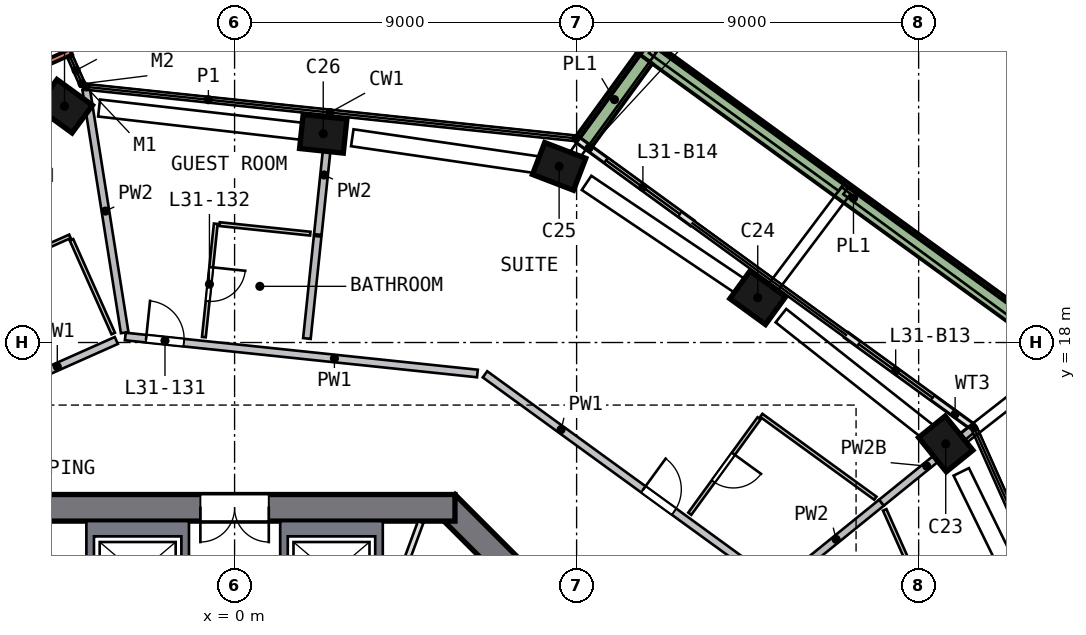
"""IFC4 building model, lengths in metres.
Left out: names, types, materials, properties, quantities, classifications, styles, units other than length and angle.
Written with IfcOpenShell. Run it as: python <this file> out.ifc"""

import sys

from ifc_helpers import new_model, si_unit, direction, frame, frame_2d, origin, origin_2d, place, context, subcontext, project, spatial, polyline, rectangle, outline, extrude, element, fill, save


model = new_model("IFC4")
c1 = context("Model", 3, precision=1e-05, world=origin(), true_north=direction((0.0, 1.0)))
c2 = subcontext(c1, "Body", "Model", "MODEL_VIEW")
j1 = project(units=[si_unit("LENGTHUNIT", "METRE"), si_unit("PLANEANGLEUNIT", "RADIAN")], contexts=[c1])
p1 = place(None, origin())
s1 = spatial("IfcSite", under=j1, at=p1, CompositionType="ELEMENT")
p2 = place(p1, origin())
s2 = spatial("IfcBuilding", under=s1, at=p2, CompositionType="ELEMENT")
p3 = place(p2, frame((0.0, 0.0, 133.0)))
s3 = spatial("IfcBuildingStorey", under=s2, at=p3, CompositionType="ELEMENT", Elevation=133.0)
p4 = place(p3, frame((18.801, 15.225, 0.0), z_axis=(-0.073137387, 0.088798823, 0.993360806), x_axis=(0.62500061, -0.772101593, 0.115036373)))
e1 = element("IfcColumn", 1, at=p4, inside=s3, PredefinedType="COLUMN", context=c2, shape_type="SweptSolid", body=[
    extrude(rectangle(XDim=1.15, YDim=0.9, at=origin_2d()), origin(), (0.0, 0.0, 1.0), 3.211),
])
p5 = place(p3, frame((13.877, 19.1, 0.0), z_axis=(-0.091412441, 0.065251144, 0.993673012), x_axis=(-0.803839453, 0.584148171, -0.112307833)))
e2 = element("IfcColumn", 2, at=p5, inside=s3, PredefinedType="COLUMN", context=c2, shape_type="SweptSolid", body=[
    extrude(rectangle(XDim=1.15, YDim=0.9, at=origin_2d()), origin(), (0.0, 0.0, 1.0), 3.21),
])
p6 = place(p3, frame((8.67, 22.586, 0.0), z_axis=(-0.107729337, 0.040369992, 0.993360284), x_axis=(0.927200738, -0.356460917, 0.115040884)))
e3 = element("IfcColumn", 3, at=p6, inside=s3, PredefinedType="COLUMN", context=c2, shape_type="SweptSolid", body=[
    extrude(rectangle(XDim=1.15, YDim=0.9, at=origin_2d()), origin(), (0.0, 0.0, 1.0), 3.211),
])
p7 = place(p3, frame((2.468, 23.479, 0.0), z_axis=(-0.111793887, 0.010799137, 0.993672736), x_axis=(-0.98822294, 0.103931825, -0.112310274)))
e4 = element("IfcColumn", 4, at=p7, inside=s3, PredefinedType="COLUMN", context=c2, shape_type="SweptSolid", body=[
    extrude(rectangle(XDim=1.15, YDim=0.9, at=origin_2d()), origin(), (0.0, 0.0, 1.0), 3.21),
])
p8 = place(p3, frame((-4.336, 24.244, 0.0), z_axis=(-0.115076293, -0.021586306, 0.993122086), x_axis=(0.802407677, -0.591373084, 0.080123624)))
e5 = element("IfcColumn", 5, at=p8, inside=s3, PredefinedType="COLUMN", context=c2, shape_type="SweptSolid", body=[
    extrude(rectangle(XDim=1.15, YDim=0.9, at=origin_2d()), origin(), (0.0, 0.0, 1.0), 3.212),
])
p9 = place(p3, frame((13.752, 5.552, 0.0), z_axis=(0.0, 0.0, 1.0), x_axis=(-0.707106781, 0.707106781, 0.0)))
e6 = element("IfcWall", 6, at=p9, inside=s3, PredefinedType="SHEAR", context=c2, shape_type="SweptSolid", body=[
    extrude(rectangle(XDim=11.598, YDim=0.7, at=frame_2d((5.799, 0.0))), origin(), (0.0, 0.0, 1.0), 3.5),
])
p10 = place(p9, frame((2.099, 0.0, 0.0)))
e7 = element("IfcOpeningElement", 7, at=p10, cuts=e6, PredefinedType="OPENING", context=c2, shape_type="SweptSolid", body=[
    extrude(rectangle(XDim=1.2, YDim=2.1, at=frame_2d((0.6, 1.05))), frame((0.0, 0.36, 0.0), z_axis=(0.0, -1.0, 0.0), x_axis=(1.0, 0.0, 0.0)), (0.0, 0.0, 1.0), 0.72),
])
p11 = place(p3, frame((5.799, 13.65, 0.0), z_axis=(0.0, 0.0, 1.0), x_axis=(-1.0, 0.0, 0.0)))
e8 = element("IfcWall", 8, at=p11, inside=s3, PredefinedType="SHEAR", context=c2, shape_type="SweptSolid", body=[
    extrude(rectangle(XDim=11.598, YDim=0.7, at=frame_2d((5.799, 0.0))), origin(), (0.0, 0.0, 1.0), 3.5),
])
p12 = place(p11, frame((4.899, 0.0, 0.0)))
e9 = element("IfcOpeningElement", 9, at=p12, cuts=e8, PredefinedType="OPENING", context=c2, shape_type="SweptSolid", body=[
    extrude(rectangle(XDim=1.8, YDim=2.1, at=frame_2d((0.9, 1.05))), frame((0.0, 0.36, 0.0), z_axis=(0.0, -1.0, 0.0), x_axis=(1.0, 0.0, 0.0)), (0.0, 0.0, 1.0), 0.72),
])
p13 = place(p3, frame((-4.305, 25.65, 0.0), z_axis=(0.0, 0.0, 1.0), x_axis=(-0.913532126, -0.406766585, 0.0)))
e10 = element("IfcWall", 10, at=p13, inside=s3, PredefinedType="SOLIDWALL", context=c2, shape_type="SweptSolid", body=[
    extrude(rectangle(XDim=1.875, YDim=0.15, at=frame_2d((0.938, 0.0))), origin(), (0.0, 0.0, 1.0), 3.19),
])
p14 = place(p3, frame((19.392, 15.803, 0.0), z_axis=(0.0, 0.0, 1.0), x_axis=(-0.808990358, 0.587821913, 0.0)))
e11 = element("IfcWall", 11, at=p14, inside=s3, PredefinedType="SOLIDWALL", context=c2, shape_type="SweptSolid", body=[
    extrude(rectangle(XDim=4.068, YDim=0.15, at=frame_2d((2.034, 0.0))), origin(), (0.0, 0.0, 1.0), 2.475),
])
p15 = place(p14, frame((1.268, 0.0, 0.0)))
e12 = element("IfcOpeningElement", 12, at=p15, cuts=e11, PredefinedType="OPENING", context=c2, shape_type="SweptSolid", body=[
    extrude(rectangle(XDim=2.4, YDim=2.4, at=frame_2d((1.2, 1.2))), frame((0.0, 0.085, 0.0), z_axis=(0.0, -1.0, 0.0), x_axis=(1.0, 0.0, 0.0)), (0.0, 0.0, 1.0), 0.17),
])
p16 = place(p3, frame((12.039, 21.146, 0.0), z_axis=(0.0, 0.0, 1.0), x_axis=(-0.809020557, 0.587780349, 0.0)))
e13 = element("IfcWall", 13, at=p16, inside=s3, PredefinedType="SOLIDWALL", context=c2, shape_type="SweptSolid", body=[
    extrude(rectangle(XDim=3.71, YDim=0.15, at=frame_2d((1.855, 0.0))), origin(), (0.0, 0.0, 1.0), 2.475),
])
p17 = place(p16, frame((0.4, 0.0, 0.0)))
e14 = element("IfcOpeningElement", 14, at=p17, cuts=e13, PredefinedType="OPENING", context=c2, shape_type="SweptSolid", body=[
    extrude(rectangle(XDim=2.4, YDim=2.4, at=frame_2d((1.2, 1.2))), frame((0.0, 0.085, 0.0), z_axis=(0.0, -1.0, 0.0), x_axis=(1.0, 0.0, 0.0)), (0.0, 0.0, 1.0), 0.17),
])
p18 = place(p3, frame((21.837, 17.766, 0.0), z_axis=(0.0, 0.0, 1.0), x_axis=(-0.809019092, 0.587782365, 0.0)))
e15 = element("IfcWall", 15, at=p18, inside=s3, PredefinedType="SOLIDWALL", context=c2, shape_type="SweptSolid", body=[
    extrude(rectangle(XDim=13.723, YDim=0.5, at=frame_2d((6.862, 0.0))), origin(), (0.0, 0.0, 1.0), 0.7),
])
p19 = place(p3, frame((10.789, 25.483, 0.0), z_axis=(0.0, 0.0, 1.0), x_axis=(-0.587773626, -0.809025441, 0.0)))
e16 = element("IfcWall", 16, at=p19, inside=s3, PredefinedType="SOLIDWALL", context=c2, shape_type="SweptSolid", body=[
    extrude(rectangle(XDim=2.699, YDim=0.5, at=frame_2d((1.35, 0.0))), origin(), (0.0, 0.0, 1.0), 0.7),
])
p20 = place(p3, origin())
e17 = element("IfcWall", 17, at=p20, inside=s3, PredefinedType="SOLIDWALL", context=c2, shape_type="SweptSolid", body=[
    extrude(outline(polyline([(3.9, 13.3), (3.9, 10.9), (3.7, 10.9), (3.7, 12.9), (1.4, 12.9), (1.4, 10.9), (1.2, 10.9), (1.2, 13.3), (3.9, 13.3)])), origin(), (0.0, 0.0, 1.0), 3.19),
])
p21 = place(p3, origin())
e18 = element("IfcWall", 18, at=p21, inside=s3, PredefinedType="SOLIDWALL", context=c2, shape_type="SweptSolid", body=[
    extrude(outline(polyline([(-3.9, 10.9), (-3.9, 13.3), (-1.2, 13.3), (-1.2, 10.9), (-1.4, 10.9), (-1.4, 12.9), (-3.7, 12.9), (-3.7, 10.9), (-3.9, 10.9)])), origin(), (0.0, 0.0, 1.0), 3.19),
])
p22 = place(p3, frame((1.776, 4.813, 0.0), z_axis=(0.0, 0.0, 1.0), x_axis=(0.346109381, 0.938194168, 0.0)))
e19 = element("IfcWall", 19, at=p22, inside=s3, PredefinedType="PARTITIONING", context=c2, shape_type="SweptSolid", body=[
    extrude(rectangle(XDim=9.016, YDim=0.15, at=frame_2d((4.508, 0.0))), origin(), (0.0, 0.0, 1.0), 3.19),
])
p23 = place(p22, frame((1.4, 0.0, 0.0)))
e20 = element("IfcOpeningElement", 20, at=p23, cuts=e19, PredefinedType="OPENING", context=c2, shape_type="SweptSolid", body=[
    extrude(rectangle(XDim=1.8, YDim=2.1, at=frame_2d((0.9, 1.05))), frame((0.0, 0.085, 0.0), z_axis=(0.0, -1.0, 0.0), x_axis=(1.0, 0.0, 0.0)), (0.0, 0.0, 1.0), 0.17),
])
p24 = place(p3, frame((-3.112, 18.053, 0.0), z_axis=(0.0, 0.0, 1.0), x_axis=(-0.913524094, -0.406784624, 0.0)))
e21 = element("IfcWall", 21, at=p24, inside=s3, PredefinedType="SOLIDWALL", context=c2, shape_type="SweptSolid", body=[
    extrude(rectangle(XDim=3.4, YDim=0.2, at=frame_2d((1.7, 0.0))), origin(), (0.0, 0.0, 1.0), 3.19),
])
p25 = place(p3, frame((-2.876, 18.158, 0.0), z_axis=(0.0, 0.0, 1.0), x_axis=(0.994521094, -0.104536091, 0.0)))
e22 = element("IfcWall", 22, at=p25, inside=s3, PredefinedType="SOLIDWALL", context=c2, shape_type="SweptSolid", body=[
    extrude(rectangle(XDim=9.316, YDim=0.2, at=frame_2d((4.658, 0.0))), origin(), (0.0, 0.0, 1.0), 3.19),
])
p26 = place(p25, frame((0.55, 0.0, 0.0)))
e23 = element("IfcOpeningElement", 23, at=p26, cuts=e22, PredefinedType="OPENING", context=c2, shape_type="SweptSolid", body=[
    extrude(rectangle(XDim=1.0, YDim=2.1, at=frame_2d((0.5, 1.05))), frame((0.0, 0.11, 0.0), z_axis=(0.0, -1.0, 0.0), x_axis=(1.0, 0.0, 0.0)), (0.0, 0.0, 1.0), 0.22),
])
p27 = place(p3, frame((6.589, 17.163, 0.0), z_axis=(0.0, 0.0, 1.0), x_axis=(0.809014458, -0.587788744, 0.0)))
e24 = element("IfcWall", 24, at=p27, inside=s3, PredefinedType="SOLIDWALL", context=c2, shape_type="SweptSolid", body=[
    extrude(rectangle(XDim=9.516, YDim=0.2, at=frame_2d((4.758, 0.0))), origin(), (0.0, 0.0, 1.0), 3.19),
])
p28 = place(p27, frame((5.15, 0.0, 0.0)))
e25 = element("IfcOpeningElement", 25, at=p28, cuts=e24, PredefinedType="OPENING", context=c2, shape_type="SweptSolid", body=[
    extrude(rectangle(XDim=1.0, YDim=2.1, at=frame_2d((0.5, 1.05))), frame((0.0, 0.11, 0.0), z_axis=(0.0, -1.0, 0.0), x_axis=(1.0, 0.0, 0.0)), (0.0, 0.0, 1.0), 0.22),
])
p29 = place(p3, frame((-3.905, 24.657, 0.0), z_axis=(0.0, 0.0, 1.0), x_axis=(0.156458166, -0.987684586, 0.0)))
e26 = element("IfcWall", 26, at=p29, inside=s3, PredefinedType="SOLIDWALL", context=c2, shape_type="SweptSolid", body=[
    extrude(rectangle(XDim=6.476, YDim=0.2, at=frame_2d((3.238, 0.0))), origin(), (0.0, 0.0, 1.0), 3.19),
])
p30 = place(p3, frame((1.903, 18.106, 0.0), z_axis=(0.0, 0.0, 1.0), x_axis=(0.104525029, 0.994522256, 0.0)))
e27 = element("IfcWall", 27, at=p30, inside=s3, PredefinedType="SOLIDWALL", context=c2, shape_type="SweptSolid", body=[
    extrude(rectangle(XDim=2.705, YDim=0.2, at=frame_2d((1.353, 0.0))), origin(), (0.0, 0.0, 1.0), 3.19),
])
p31 = place(p3, frame((2.19, 20.842, 0.0), z_axis=(0.0, 0.0, 1.0), x_axis=(0.104563827, 0.994518178, 0.0)))
e28 = element("IfcWall", 28, at=p31, inside=s3, PredefinedType="SOLIDWALL", context=c2, shape_type="SweptSolid", body=[
    extrude(rectangle(XDim=3.152, YDim=0.2, at=frame_2d((1.576, 0.0))), origin(), (0.0, 0.0, 1.0), 3.19),
])
p32 = place(p3, frame((14.635, 11.851, 0.0), z_axis=(0.0, 0.0, 1.0), x_axis=(0.77712644, 0.629344497, 0.0)))
e29 = element("IfcWall", 29, at=p32, inside=s3, PredefinedType="SOLIDWALL", context=c2, shape_type="SweptSolid", body=[
    extrude(rectangle(XDim=3.073, YDim=0.2, at=frame_2d((1.536, 0.0))), origin(), (0.0, 0.0, 1.0), 3.19),
])
p33 = place(p3, frame((17.023, 13.785, 0.0), z_axis=(0.0, 0.0, 1.0), x_axis=(0.777133351, 0.629335963, 0.0)))
e30 = element("IfcWall", 30, at=p33, inside=s3, PredefinedType="SOLIDWALL", context=c2, shape_type="SweptSolid", body=[
    extrude(rectangle(XDim=3.059, YDim=0.2, at=frame_2d((1.53, 0.0))), origin(), (0.0, 0.0, 1.0), 2.69),
])
p34 = place(p3, frame((-4.332, 20.794, 0.0), z_axis=(0.0, 0.0, 1.0), x_axis=(-0.913550228, -0.406725928, 0.0)))
e31 = element("IfcWall", 31, at=p34, inside=s3, PredefinedType="PARTITIONING", context=c2, shape_type="SweptSolid", body=[
    extrude(rectangle(XDim=3.2, YDim=0.1, at=frame_2d((1.6, 0.0))), origin(), (0.0, 0.0, 1.0), 3.19),
])
p35 = place(p34, frame((1.25, 0.0, 0.0)))
e32 = element("IfcOpeningElement", 32, at=p35, cuts=e31, PredefinedType="OPENING", context=c2, shape_type="SweptSolid", body=[
    extrude(rectangle(XDim=0.9, YDim=2.1, at=frame_2d((0.45, 1.05))), frame((0.0, 0.06, 0.0), z_axis=(0.0, -1.0, 0.0), x_axis=(1.0, 0.0, 0.0)), (0.0, 0.0, 1.0), 0.12),
])
p36 = place(p3, frame((-3.193, 18.236, 0.0), z_axis=(0.0, 0.0, 1.0), x_axis=(-0.40672567, 0.913550343, 0.0)))
e33 = element("IfcWall", 33, at=p36, inside=s3, PredefinedType="PARTITIONING", context=c2, shape_type="SweptSolid", body=[
    extrude(rectangle(XDim=2.7, YDim=0.1, at=frame_2d((1.35, 0.0))), origin(), (0.0, 0.0, 1.0), 3.19),
])
p37 = place(p3, frame((-0.494, 21.126, 0.0), z_axis=(0.0, 0.0, 1.0), x_axis=(-0.104570409, -0.994517486, 0.0)))
e34 = element("IfcWall", 34, at=p37, inside=s3, PredefinedType="PARTITIONING", context=c2, shape_type="SweptSolid", body=[
    extrude(rectangle(XDim=3.0, YDim=0.1, at=frame_2d((1.5, 0.0))), origin(), (0.0, 0.0, 1.0), 3.19),
])
p38 = place(p37, frame((1.15, 0.0, 0.0)))
e35 = element("IfcOpeningElement", 35, at=p38, cuts=e34, PredefinedType="OPENING", context=c2, shape_type="SweptSolid", body=[
    extrude(rectangle(XDim=0.9, YDim=2.1, at=frame_2d((0.45, 1.05))), frame((0.0, 0.06, 0.0), z_axis=(0.0, -1.0, 0.0), x_axis=(1.0, 0.0, 0.0)), (0.0, 0.0, 1.0), 0.12),
])
p39 = place(p3, frame((-0.395, 21.115, 0.0), z_axis=(0.0, 0.0, 1.0), x_axis=(0.994527171, -0.104478253, 0.0)))
e36 = element("IfcWall", 36, at=p39, inside=s3, PredefinedType="PARTITIONING", context=c2, shape_type="SweptSolid", body=[
    extrude(rectangle(XDim=2.4, YDim=0.1, at=frame_2d((1.2, 0.0))), origin(), (0.0, 0.0, 1.0), 3.19),
])
p40 = place(p3, frame((13.8, 16.003, 0.0), z_axis=(0.0, 0.0, 1.0), x_axis=(-0.58778294, -0.809018674, 0.0)))
e37 = element("IfcWall", 37, at=p40, inside=s3, PredefinedType="PARTITIONING", context=c2, shape_type="SweptSolid", body=[
    extrude(rectangle(XDim=3.1, YDim=0.1, at=frame_2d((1.55, 0.0))), origin(), (0.0, 0.0, 1.0), 3.19),
])
p41 = place(p40, frame((1.15, 0.0, 0.0)))
e38 = element("IfcOpeningElement", 38, at=p41, cuts=e37, PredefinedType="OPENING", context=c2, shape_type="SweptSolid", body=[
    extrude(rectangle(XDim=0.9, YDim=2.1, at=frame_2d((0.45, 1.05))), frame((0.0, 0.06, 0.0), z_axis=(0.0, -1.0, 0.0), x_axis=(1.0, 0.0, 0.0)), (0.0, 0.0, 1.0), 0.12),
])
p42 = place(p3, frame((13.859, 16.084, 0.0), z_axis=(0.0, 0.0, 1.0), x_axis=(0.808994891, -0.587815674, 0.0)))
e39 = element("IfcWall", 39, at=p42, inside=s3, PredefinedType="PARTITIONING", context=c2, shape_type="SweptSolid", body=[
    extrude(rectangle(XDim=3.711, YDim=0.1, at=frame_2d((1.855, 0.0))), origin(), (0.0, 0.0, 1.0), 3.19),
])
p43 = place(p3, frame((18.614, 10.212, 0.0), z_axis=(0.0, 0.0, 1.0), x_axis=(-0.406743817, 0.913542263, 0.0)))
e40 = element("IfcWall", 40, at=p43, inside=s3, PredefinedType="PARTITIONING", context=c2, shape_type="SweptSolid", body=[
    extrude(rectangle(XDim=3.704, YDim=0.1, at=frame_2d((1.852, 0.0))), origin(), (0.0, 0.0, 1.0), 3.19),
])
p44 = place(p15, origin())
e41 = element("IfcDoor", 41, at=p44, inside=s3, OperationType="SLIDING_TO_LEFT", PredefinedType="DOOR", context=c2, shape_type="SweptSolid", body=[
    extrude(rectangle(XDim=2.4, YDim=2.4, at=frame_2d((1.2, 1.2))), frame((0.0, 0.025, 0.0), z_axis=(0.0, -1.0, 0.0), x_axis=(1.0, 0.0, 0.0)), (0.0, 0.0, 1.0), 0.05),
])
fill(e12, e41)
p45 = place(p17, origin())
e42 = element("IfcDoor", 42, at=p45, inside=s3, OperationType="SLIDING_TO_RIGHT", PredefinedType="DOOR", context=c2, shape_type="SweptSolid", body=[
    extrude(rectangle(XDim=2.4, YDim=2.4, at=frame_2d((1.2, 1.2))), frame((0.0, 0.025, 0.0), z_axis=(0.0, -1.0, 0.0), x_axis=(1.0, 0.0, 0.0)), (0.0, 0.0, 1.0), 0.05),
])
fill(e14, e42)
p46 = place(p12, origin())
e43 = element("IfcDoor", 43, at=p46, inside=s3, OperationType="DOUBLE_DOOR_SINGLE_SWING", PredefinedType="DOOR", context=c2, shape_type="SweptSolid", body=[
    extrude(rectangle(XDim=1.8, YDim=2.1, at=frame_2d((0.9, 1.05))), frame((0.0, 0.025, 0.0), z_axis=(0.0, -1.0, 0.0), x_axis=(1.0, 0.0, 0.0)), (0.0, 0.0, 1.0), 0.05),
])
fill(e9, e43)
p47 = place(p28, origin())
e44 = element("IfcDoor", 44, at=p47, inside=s3, OperationType="SINGLE_SWING_LEFT", PredefinedType="DOOR", context=c2, shape_type="SweptSolid", body=[
    extrude(rectangle(XDim=1.0, YDim=2.1, at=frame_2d((0.5, 1.05))), frame((0.0, 0.025, 0.0), z_axis=(0.0, -1.0, 0.0), x_axis=(1.0, 0.0, 0.0)), (0.0, 0.0, 1.0), 0.05),
])
fill(e25, e44)
p48 = place(p41, origin())
e45 = element("IfcDoor", 45, at=p48, inside=s3, OperationType="SINGLE_SWING_LEFT", PredefinedType="DOOR", context=c2, shape_type="SweptSolid", body=[
    extrude(rectangle(XDim=0.9, YDim=2.1, at=frame_2d((0.45, 1.05))), frame((0.0, 0.025, 0.0), z_axis=(0.0, -1.0, 0.0), x_axis=(1.0, 0.0, 0.0)), (0.0, 0.0, 1.0), 0.05),
])
fill(e38, e45)
p49 = place(p26, origin())
e46 = element("IfcDoor", 46, at=p49, inside=s3, OperationType="SINGLE_SWING_LEFT", PredefinedType="DOOR", context=c2, shape_type="SweptSolid", body=[
    extrude(rectangle(XDim=1.0, YDim=2.1, at=frame_2d((0.5, 1.05))), frame((0.0, 0.025, 0.0), z_axis=(0.0, -1.0, 0.0), x_axis=(1.0, 0.0, 0.0)), (0.0, 0.0, 1.0), 0.05),
])
fill(e23, e46)
p50 = place(p38, origin())
e47 = element("IfcDoor", 47, at=p50, inside=s3, OperationType="SINGLE_SWING_LEFT", PredefinedType="DOOR", context=c2, shape_type="SweptSolid", body=[
    extrude(rectangle(XDim=0.9, YDim=2.1, at=frame_2d((0.45, 1.05))), frame((0.0, 0.025, 0.0), z_axis=(0.0, -1.0, 0.0), x_axis=(1.0, 0.0, 0.0)), (0.0, 0.0, 1.0), 0.05),
])
fill(e35, e47)
save(model, sys.argv[1])
